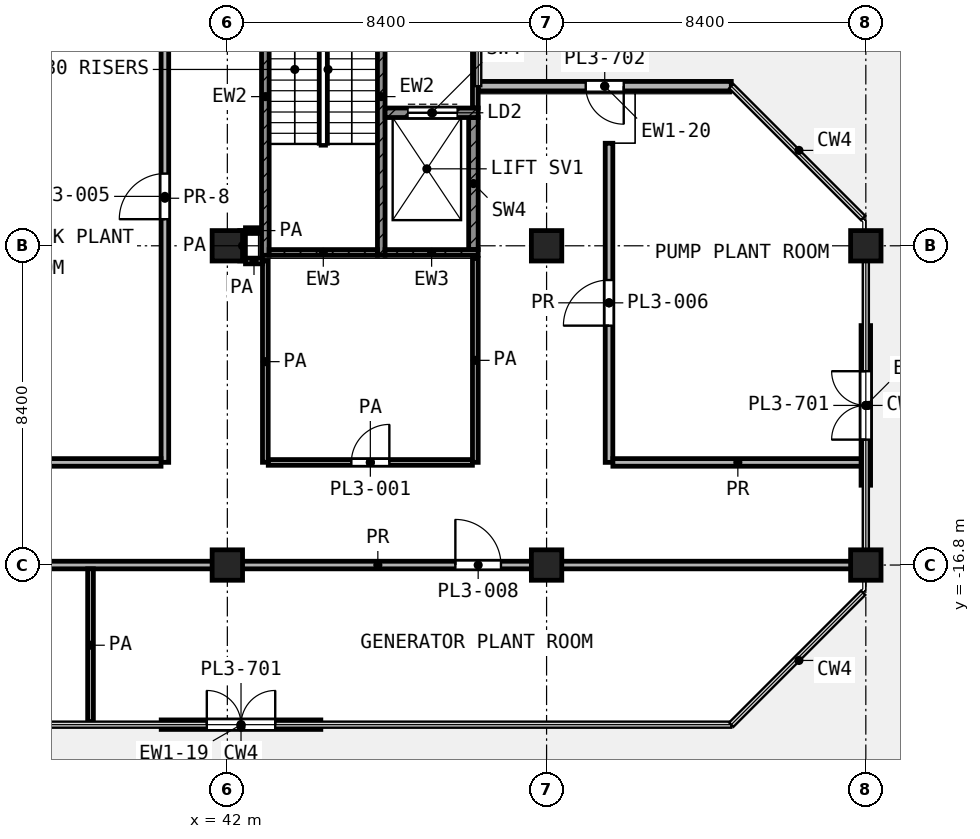
"""IFC4 building model, lengths in metres.
Left out: names, types, materials, properties, quantities, classifications, styles, units other than length and angle.
Written with IfcOpenShell. Run it as: python <this file> out.ifc"""

import sys

from ifc_helpers import new_model, si_unit, direction, frame, frame_2d, origin, origin_2d, place, context, subcontext, project, spatial, rectangle, extrude, element, fill, save


model = new_model("IFC4")
c1 = context("Model", 3, precision=1e-05, world=origin(), true_north=direction((0.0, 1.0)))
c2 = subcontext(c1, "Body", "Model", "MODEL_VIEW")
j1 = project(units=[si_unit("LENGTHUNIT", "METRE"), si_unit("PLANEANGLEUNIT", "RADIAN")], contexts=[c1])
p1 = place(None, origin())
s1 = spatial("IfcSite", under=j1, at=p1, CompositionType="ELEMENT")
p2 = place(p1, origin())
s2 = spatial("IfcBuilding", under=s1, at=p2, CompositionType="ELEMENT")
p3 = place(p2, frame((0.0, 0.0, 272.6)))
s3 = spatial("IfcBuildingStorey", under=s2, at=p3, CompositionType="ELEMENT", Elevation=272.6)
for number, where, z_axis, x_axis in (
    (1, (42.0, -8.4, 0.0), (0.0, 0.0, 1.0), (1.0, 0.0, 0.0)),
    (2, (50.4, -8.4, 0.0), (0.0, 0.0, 1.0), (1.0, 0.0, 0.0)),
    (3, (58.8, -8.4, 0.0), (0.0, 0.0, 1.0), (1.0, 0.0, 0.0)),
    (4, (42.0, -16.8, 0.0), (0.0, 0.0, 1.0), (1.0, 0.0, 0.0)),
    (5, (50.4, -16.8, 0.0), (0.0, 0.0, 1.0), (1.0, 0.0, 0.0)),
    (6, (58.8, -16.8, 0.0), (0.0, 0.0, 1.0), (1.0, 0.0, 0.0)),
):
    element("IfcColumn", number, at=place(p3, frame(where, z_axis=z_axis, x_axis=x_axis)), inside=s3, PredefinedType="COLUMN", context=c2, shape_type="SweptSolid", body=[
        extrude(rectangle(XDim=0.8, YDim=0.8, at=origin_2d()), origin(), (0.0, 0.0, 1.0), 5.0),
    ])
p4 = place(p3, frame((40.26, -21.0, 0.0), z_axis=(0.0, 0.0, 1.0), x_axis=(1.0, 0.0, 0.0)))
e7 = element("IfcWall", 7, at=p4, inside=s3, PredefinedType="SOLIDWALL", context=c2, shape_type="SweptSolid", body=[
    extrude(rectangle(XDim=4.2, YDim=0.25, at=frame_2d((2.1, 0.0))), origin(), (0.0, 0.0, 1.0), 4.24),
])
p5 = place(p4, frame((1.2, 0.0, 0.0)))
e8 = element("IfcOpeningElement", 8, at=p5, cuts=e7, PredefinedType="OPENING", context=c2, shape_type="SweptSolid", body=[
    extrude(rectangle(XDim=1.8, YDim=2.1, at=frame_2d((0.9, 1.05))), frame((0.0, 0.135, 0.0), z_axis=(0.0, -1.0, 0.0), x_axis=(1.0, 0.0, 0.0)), (0.0, 0.0, 1.0), 0.27),
])
p6 = place(p3, frame((58.8, -14.7, 0.0), z_axis=(0.0, 0.0, 1.0), x_axis=(0.0, 1.0, 0.0)))
e9 = element("IfcWall", 9, at=p6, inside=s3, PredefinedType="SOLIDWALL", context=c2, shape_type="SweptSolid", body=[
    extrude(rectangle(XDim=4.2, YDim=0.25, at=frame_2d((2.1, 0.0))), origin(), (0.0, 0.0, 1.0), 4.24),
])
p7 = place(p6, frame((1.2, 0.0, 0.0)))
e10 = element("IfcOpeningElement", 10, at=p7, cuts=e9, PredefinedType="OPENING", context=c2, shape_type="SweptSolid", body=[
    extrude(rectangle(XDim=1.8, YDim=2.1, at=frame_2d((0.9, 1.05))), frame((0.0, 0.135, 0.0), z_axis=(0.0, -1.0, 0.0), x_axis=(1.0, 0.0, 0.0)), (0.0, 0.0, 1.0), 0.27),
])
p8 = place(p3, frame((55.26, -4.2, 0.0), z_axis=(0.0, 0.0, 1.0), x_axis=(-1.0, 0.0, 0.0)))
e11 = element("IfcWall", 11, at=p8, inside=s3, PredefinedType="SOLIDWALL", context=c2, shape_type="SweptSolid", body=[
    extrude(rectangle(XDim=6.659, YDim=0.25, at=frame_2d((3.33, 0.0))), origin(), (0.0, 0.0, 1.0), 4.4),
])
p9 = place(p8, frame((2.83, 0.0, 0.0)))
e12 = element("IfcOpeningElement", 12, at=p9, cuts=e11, PredefinedType="OPENING", context=c2, shape_type="SweptSolid", body=[
    extrude(rectangle(XDim=1.0, YDim=2.1, at=frame_2d((0.5, 1.05))), frame((0.0, 0.135, 0.0), z_axis=(0.0, -1.0, 0.0), x_axis=(1.0, 0.0, 0.0)), (0.0, 0.0, 1.0), 0.27),
])
p10 = place(p3, frame((43.0, -8.65, 0.0), z_axis=(0.0, 0.0, 1.0), x_axis=(0.0, 1.0, 0.0)))
e13 = element("IfcWall", 13, at=p10, inside=s3, PredefinedType="SHEAR", context=c2, shape_type="SweptSolid", body=[
    extrude(rectangle(XDim=8.35, YDim=0.2, at=frame_2d((4.175, 0.0))), origin(), (0.0, 0.0, 1.0), 4.4),
])
p11 = place(p10, frame((7.0, 0.0, 0.0)))
e14 = element("IfcOpeningElement", 14, at=p11, cuts=e13, PredefinedType="OPENING", context=c2, shape_type="SweptSolid", body=[
    extrude(rectangle(XDim=1.1, YDim=2.1, at=frame_2d((0.55, 1.05))), frame((0.0, 0.11, 0.0), z_axis=(0.0, -1.0, 0.0), x_axis=(1.0, 0.0, 0.0)), (0.0, 0.0, 1.0), 0.22),
])
p12 = place(p3, frame((46.05, -8.65, 0.0), z_axis=(0.0, 0.0, 1.0), x_axis=(0.0, 1.0, 0.0)))
e15 = element("IfcWall", 15, at=p12, inside=s3, PredefinedType="SHEAR", context=c2, shape_type="SweptSolid", body=[
    extrude(rectangle(XDim=8.35, YDim=0.2, at=frame_2d((4.175, 0.0))), origin(), (0.0, 0.0, 1.0), 4.4),
])
p13 = place(p12, frame((7.0, 0.0, 0.0)))
e16 = element("IfcOpeningElement", 16, at=p13, cuts=e15, PredefinedType="OPENING", context=c2, shape_type="SweptSolid", body=[
    extrude(rectangle(XDim=1.1, YDim=2.1, at=frame_2d((0.55, 1.05))), frame((0.0, 0.11, 0.0), z_axis=(0.0, -1.0, 0.0), x_axis=(1.0, 0.0, 0.0)), (0.0, 0.0, 1.0), 0.22),
])
p14 = place(p3, frame((43.1, -8.575, 0.0), z_axis=(0.0, 0.0, 1.0), x_axis=(1.0, 0.0, 0.0)))
e17 = element("IfcWall", 17, at=p14, inside=s3, PredefinedType="SHEAR", context=c2, shape_type="SweptSolid", body=[
    extrude(rectangle(XDim=2.85, YDim=0.15, at=frame_2d((1.425, 0.0))), origin(), (0.0, 0.0, 1.0), 4.4),
])
p15 = place(p3, frame((46.15, -8.575, 0.0), z_axis=(0.0, 0.0, 1.0), x_axis=(1.0, 0.0, 0.0)))
e18 = element("IfcWall", 18, at=p15, inside=s3, PredefinedType="SHEAR", context=c2, shape_type="SweptSolid", body=[
    extrude(rectangle(XDim=2.45, YDim=0.15, at=frame_2d((1.225, 0.0))), origin(), (0.0, 0.0, 1.0), 4.4),
])
p16 = place(p3, frame((46.15, -4.9, 0.0), z_axis=(0.0, 0.0, 1.0), x_axis=(1.0, 0.0, 0.0)))
e19 = element("IfcWall", 19, at=p16, inside=s3, PredefinedType="SHEAR", context=c2, shape_type="SweptSolid", body=[
    extrude(rectangle(XDim=2.45, YDim=0.25, at=frame_2d((1.225, 0.0))), origin(), (0.0, 0.0, 1.0), 4.4),
])
p17 = place(p16, frame((0.6, 0.0, 0.0)))
e20 = element("IfcOpeningElement", 20, at=p17, cuts=e19, PredefinedType="OPENING", context=c2, shape_type="SweptSolid", body=[
    extrude(rectangle(XDim=1.3, YDim=2.1, at=frame_2d((0.65, 1.05))), frame((0.0, 0.135, 0.0), z_axis=(0.0, -1.0, 0.0), x_axis=(1.0, 0.0, 0.0)), (0.0, 0.0, 1.0), 0.27),
])
p18 = place(p3, frame((48.475, -8.5, 0.0), z_axis=(0.0, 0.0, 1.0), x_axis=(0.0, 1.0, 0.0)))
e21 = element("IfcWall", 21, at=p18, inside=s3, PredefinedType="SHEAR", context=c2, shape_type="SweptSolid", body=[
    extrude(rectangle(XDim=3.475, YDim=0.25, at=frame_2d((1.738, 0.0))), origin(), (0.0, 0.0, 1.0), 4.4),
])
p19 = place(p3, frame((48.525, -4.775, 0.0), z_axis=(0.0, 0.0, 1.0), x_axis=(0.0, 1.0, 0.0)))
e22 = element("IfcWall", 22, at=p19, inside=s3, PredefinedType="PARTITIONING", context=c2, shape_type="SweptSolid", body=[
    extrude(rectangle(XDim=4.325, YDim=0.15, at=frame_2d((2.163, 0.0))), origin(), (0.0, 0.0, 1.0), 4.4),
])
p20 = place(p19, frame((1.625, 0.0, 0.0)))
e23 = element("IfcOpeningElement", 23, at=p20, cuts=e22, PredefinedType="OPENING", context=c2, shape_type="SweptSolid", body=[
    extrude(rectangle(XDim=1.1, YDim=2.1, at=frame_2d((0.55, 1.05))), frame((0.0, 0.085, 0.0), z_axis=(0.0, -1.0, 0.0), x_axis=(1.0, 0.0, 0.0)), (0.0, 0.0, 1.0), 0.17),
])
p21 = place(p3, frame((43.077, -14.1, 0.0), z_axis=(0.0, 0.0, 1.0), x_axis=(1.0, 0.0, 0.0)))
e24 = element("IfcWall", 24, at=p21, inside=s3, PredefinedType="PARTITIONING", context=c2, shape_type="SweptSolid", body=[
    extrude(rectangle(XDim=5.371, YDim=0.15, at=frame_2d((2.686, 0.0))), origin(), (0.0, 0.0, 1.0), 4.4),
])
p22 = place(p21, frame((2.186, 0.0, 0.0)))
e25 = element("IfcOpeningElement", 25, at=p22, cuts=e24, PredefinedType="OPENING", context=c2, shape_type="SweptSolid", body=[
    extrude(rectangle(XDim=1.0, YDim=2.1, at=frame_2d((0.5, 1.05))), frame((0.0, 0.085, 0.0), z_axis=(0.0, -1.0, 0.0), x_axis=(1.0, 0.0, 0.0)), (0.0, 0.0, 1.0), 0.17),
])
p23 = place(p3, frame((42.478, -8.8, 0.0), z_axis=(0.0, 0.0, 1.0), x_axis=(1.0, 0.0, 0.0)))
e26 = element("IfcWall", 26, at=p23, inside=s3, PredefinedType="PARTITIONING", context=c2, shape_type="SweptSolid", body=[
    extrude(rectangle(XDim=0.447, YDim=0.15, at=frame_2d((0.224, 0.0))), origin(), (0.0, 0.0, 1.0), 4.4),
])
p24 = place(p3, frame((42.477, -8.0, 0.0), z_axis=(0.0, 0.0, 1.0), x_axis=(1.0, 0.0, 0.0)))
e27 = element("IfcWall", 27, at=p24, inside=s3, PredefinedType="PARTITIONING", context=c2, shape_type="SweptSolid", body=[
    extrude(rectangle(XDim=0.343, YDim=0.15, at=frame_2d((0.171, 0.0))), origin(), (0.0, 0.0, 1.0), 4.4),
])
p25 = place(p3, frame((38.4, -20.92, 0.0), z_axis=(0.0, 0.0, 1.0), x_axis=(0.0, 1.0, 0.0)))
e28 = element("IfcWall", 28, at=p25, inside=s3, PredefinedType="PARTITIONING", context=c2, shape_type="SweptSolid", body=[
    extrude(rectangle(XDim=4.02, YDim=0.15, at=frame_2d((2.01, 0.0))), origin(), (0.0, 0.0, 1.0), 4.4),
])
p26 = place(p3, frame((42.4, -8.797, 0.0), z_axis=(0.0, 0.0, 1.0), x_axis=(0.0, 1.0, 0.0)))
e29 = element("IfcWall", 29, at=p26, inside=s3, PredefinedType="PARTITIONING", context=c2, shape_type="SweptSolid", body=[
    extrude(rectangle(XDim=0.796, YDim=0.15, at=frame_2d((0.398, 0.0))), origin(), (0.0, 0.0, 1.0), 4.4),
])
p27 = place(p3, frame((43.0, -14.097, 0.0), z_axis=(0.0, 0.0, 1.0), x_axis=(0.0, 1.0, 0.0)))
e30 = element("IfcWall", 30, at=p27, inside=s3, PredefinedType="PARTITIONING", context=c2, shape_type="SweptSolid", body=[
    extrude(rectangle(XDim=5.297, YDim=0.15, at=frame_2d((2.648, 0.0))), origin(), (0.0, 0.0, 1.0), 4.4),
])
p28 = place(p3, frame((48.525, -14.098, 0.0), z_axis=(0.0, 0.0, 1.0), x_axis=(0.0, 1.0, 0.0)))
e31 = element("IfcWall", 31, at=p28, inside=s3, PredefinedType="PARTITIONING", context=c2, shape_type="SweptSolid", body=[
    extrude(rectangle(XDim=5.368, YDim=0.15, at=frame_2d((2.684, 0.0))), origin(), (0.0, 0.0, 1.0), 4.4),
])
p29 = place(p3, frame((33.2, -16.8, 0.0), z_axis=(0.0, 0.0, 1.0), x_axis=(1.0, 0.0, 0.0)))
e32 = element("IfcWall", 32, at=p29, inside=s3, PredefinedType="PARTITIONING", context=c2, shape_type="SweptSolid", body=[
    extrude(rectangle(XDim=25.52, YDim=0.2, at=frame_2d((12.76, 0.0))), origin(), (0.0, 0.0, 1.0), 4.4),
])
p30 = place(p29, frame((0.9, 0.0, 0.0)))
e33 = element("IfcOpeningElement", 33, at=p30, cuts=e32, PredefinedType="OPENING", context=c2, shape_type="SweptSolid", body=[
    extrude(rectangle(XDim=1.2, YDim=2.1, at=frame_2d((0.6, 1.05))), frame((0.0, 0.11, 0.0), z_axis=(0.0, -1.0, 0.0), x_axis=(1.0, 0.0, 0.0)), (0.0, 0.0, 1.0), 0.22),
])
p31 = place(p29, frame((14.8, 0.0, 0.0)))
e34 = element("IfcOpeningElement", 34, at=p31, cuts=e32, PredefinedType="OPENING", context=c2, shape_type="SweptSolid", body=[
    extrude(rectangle(XDim=1.2, YDim=2.1, at=frame_2d((0.6, 1.05))), frame((0.0, 0.11, 0.0), z_axis=(0.0, -1.0, 0.0), x_axis=(1.0, 0.0, 0.0)), (0.0, 0.0, 1.0), 0.22),
])
p32 = place(p3, frame((33.7, -14.1, 0.0), z_axis=(0.0, 0.0, 1.0), x_axis=(1.0, 0.0, 0.0)))
e35 = element("IfcWall", 35, at=p32, inside=s3, PredefinedType="PARTITIONING", context=c2, shape_type="SweptSolid", body=[
    extrude(rectangle(XDim=6.555, YDim=0.2, at=frame_2d((3.277, 0.0))), origin(), (0.0, 0.0, 1.0), 4.4),
])
p33 = place(p3, frame((52.145, -14.1, 0.0), z_axis=(0.0, 0.0, 1.0), x_axis=(1.0, 0.0, 0.0)))
e36 = element("IfcWall", 36, at=p33, inside=s3, PredefinedType="PARTITIONING", context=c2, shape_type="SweptSolid", body=[
    extrude(rectangle(XDim=6.575, YDim=0.2, at=frame_2d((3.288, 0.0))), origin(), (0.0, 0.0, 1.0), 4.4),
])
p34 = place(p3, frame((40.357, -14.098, 0.0), z_axis=(0.0, 0.0, 1.0), x_axis=(0.0, 1.0, 0.0)))
e37 = element("IfcWall", 37, at=p34, inside=s3, PredefinedType="PARTITIONING", context=c2, shape_type="SweptSolid", body=[
    extrude(rectangle(XDim=13.898, YDim=0.2, at=frame_2d((6.949, 0.0))), origin(), (0.0, 0.0, 1.0), 3.3),
])
p35 = place(p34, frame((6.398, 0.0, 0.0)))
e38 = element("IfcOpeningElement", 38, at=p35, cuts=e37, PredefinedType="OPENING", context=c2, shape_type="SweptSolid", body=[
    extrude(rectangle(XDim=1.2, YDim=2.1, at=frame_2d((0.6, 1.05))), frame((0.0, 0.11, 0.0), z_axis=(0.0, -1.0, 0.0), x_axis=(1.0, 0.0, 0.0)), (0.0, 0.0, 1.0), 0.22),
])
p36 = place(p3, frame((52.043, -14.099, 0.0), z_axis=(0.0, 0.0, 1.0), x_axis=(0.0, 1.0, 0.0)))
e39 = element("IfcWall", 39, at=p36, inside=s3, PredefinedType="PARTITIONING", context=c2, shape_type="SweptSolid", body=[
    extrude(rectangle(XDim=8.397, YDim=0.2, at=frame_2d((4.199, 0.0))), origin(), (0.0, 0.0, 1.0), 4.4),
])
p37 = place(p36, frame((3.598, 0.0, 0.0)))
e40 = element("IfcOpeningElement", 40, at=p37, cuts=e39, PredefinedType="OPENING", context=c2, shape_type="SweptSolid", body=[
    extrude(rectangle(XDim=1.2, YDim=2.1, at=frame_2d((0.6, 1.05))), frame((0.0, 0.11, 0.0), z_axis=(0.0, -1.0, 0.0), x_axis=(1.0, 0.0, 0.0)), (0.0, 0.0, 1.0), 0.22),
])
p38 = place(p5, origin())
e41 = element("IfcDoor", 41, at=p38, inside=s3, OperationType="DOUBLE_DOOR_SINGLE_SWING", PredefinedType="DOOR", context=c2, shape_type="SweptSolid", body=[
    extrude(rectangle(XDim=1.8, YDim=2.1, at=frame_2d((0.9, 1.05))), frame((0.0, 0.025, 0.0), z_axis=(0.0, -1.0, 0.0), x_axis=(1.0, 0.0, 0.0)), (0.0, 0.0, 1.0), 0.05),
])
fill(e8, e41)
p39 = place(p7, origin())
e42 = element("IfcDoor", 42, at=p39, inside=s3, OperationType="DOUBLE_DOOR_SINGLE_SWING", PredefinedType="DOOR", context=c2, shape_type="SweptSolid", body=[
    extrude(rectangle(XDim=1.8, YDim=2.1, at=frame_2d((0.9, 1.05))), frame((0.0, 0.025, 0.0), z_axis=(0.0, -1.0, 0.0), x_axis=(1.0, 0.0, 0.0)), (0.0, 0.0, 1.0), 0.05),
])
fill(e10, e42)
p40 = place(p9, origin())
e43 = element("IfcDoor", 43, at=p40, inside=s3, OperationType="SINGLE_SWING_LEFT", PredefinedType="DOOR", context=c2, shape_type="SweptSolid", body=[
    extrude(rectangle(XDim=1.0, YDim=2.1, at=frame_2d((0.5, 1.05))), frame((0.0, 0.025, 0.0), z_axis=(0.0, -1.0, 0.0), x_axis=(1.0, 0.0, 0.0)), (0.0, 0.0, 1.0), 0.05),
])
fill(e12, e43)
p41 = place(p17, origin())
e44 = element("IfcDoor", 44, at=p41, inside=s3, OperationType="DOUBLE_DOOR_SLIDING", PredefinedType="DOOR", context=c2, shape_type="SweptSolid", body=[
    extrude(rectangle(XDim=1.3, YDim=2.1, at=frame_2d((0.65, 1.05))), frame((0.0, 0.025, 0.0), z_axis=(0.0, -1.0, 0.0), x_axis=(1.0, 0.0, 0.0)), (0.0, 0.0, 1.0), 0.05),
])
fill(e20, e44)
p42 = place(p35, origin())
e45 = element("IfcDoor", 45, at=p42, inside=s3, OperationType="SINGLE_SWING_LEFT", PredefinedType="DOOR", context=c2, shape_type="SweptSolid", body=[
    extrude(rectangle(XDim=1.2, YDim=2.1, at=frame_2d((0.6, 1.05))), frame((0.0, 0.025, 0.0), z_axis=(0.0, -1.0, 0.0), x_axis=(1.0, 0.0, 0.0)), (0.0, 0.0, 1.0), 0.05),
])
fill(e38, e45)
p43 = place(p37, origin())
e46 = element("IfcDoor", 46, at=p43, inside=s3, OperationType="SINGLE_SWING_LEFT", PredefinedType="DOOR", context=c2, shape_type="SweptSolid", body=[
    extrude(rectangle(XDim=1.2, YDim=2.1, at=frame_2d((0.6, 1.05))), frame((0.0, 0.025, 0.0), z_axis=(0.0, -1.0, 0.0), x_axis=(1.0, 0.0, 0.0)), (0.0, 0.0, 1.0), 0.05),
])
fill(e40, e46)
p44 = place(p31, origin())
e47 = element("IfcDoor", 47, at=p44, inside=s3, OperationType="SINGLE_SWING_LEFT", PredefinedType="DOOR", context=c2, shape_type="SweptSolid", body=[
    extrude(rectangle(XDim=1.2, YDim=2.1, at=frame_2d((0.6, 1.05))), frame((0.0, 0.025, 0.0), z_axis=(0.0, -1.0, 0.0), x_axis=(1.0, 0.0, 0.0)), (0.0, 0.0, 1.0), 0.05),
])
fill(e34, e47)
p45 = place(p22, origin())
e48 = element("IfcDoor", 48, at=p45, inside=s3, OperationType="SINGLE_SWING_RIGHT", PredefinedType="DOOR", context=c2, shape_type="SweptSolid", body=[
    extrude(rectangle(XDim=1.0, YDim=2.1, at=frame_2d((0.5, 1.05))), frame((0.0, 0.025, 0.0), z_axis=(0.0, -1.0, 0.0), x_axis=(1.0, 0.0, 0.0)), (0.0, 0.0, 1.0), 0.05),
])
fill(e25, e48)
save(model, sys.argv[1])
